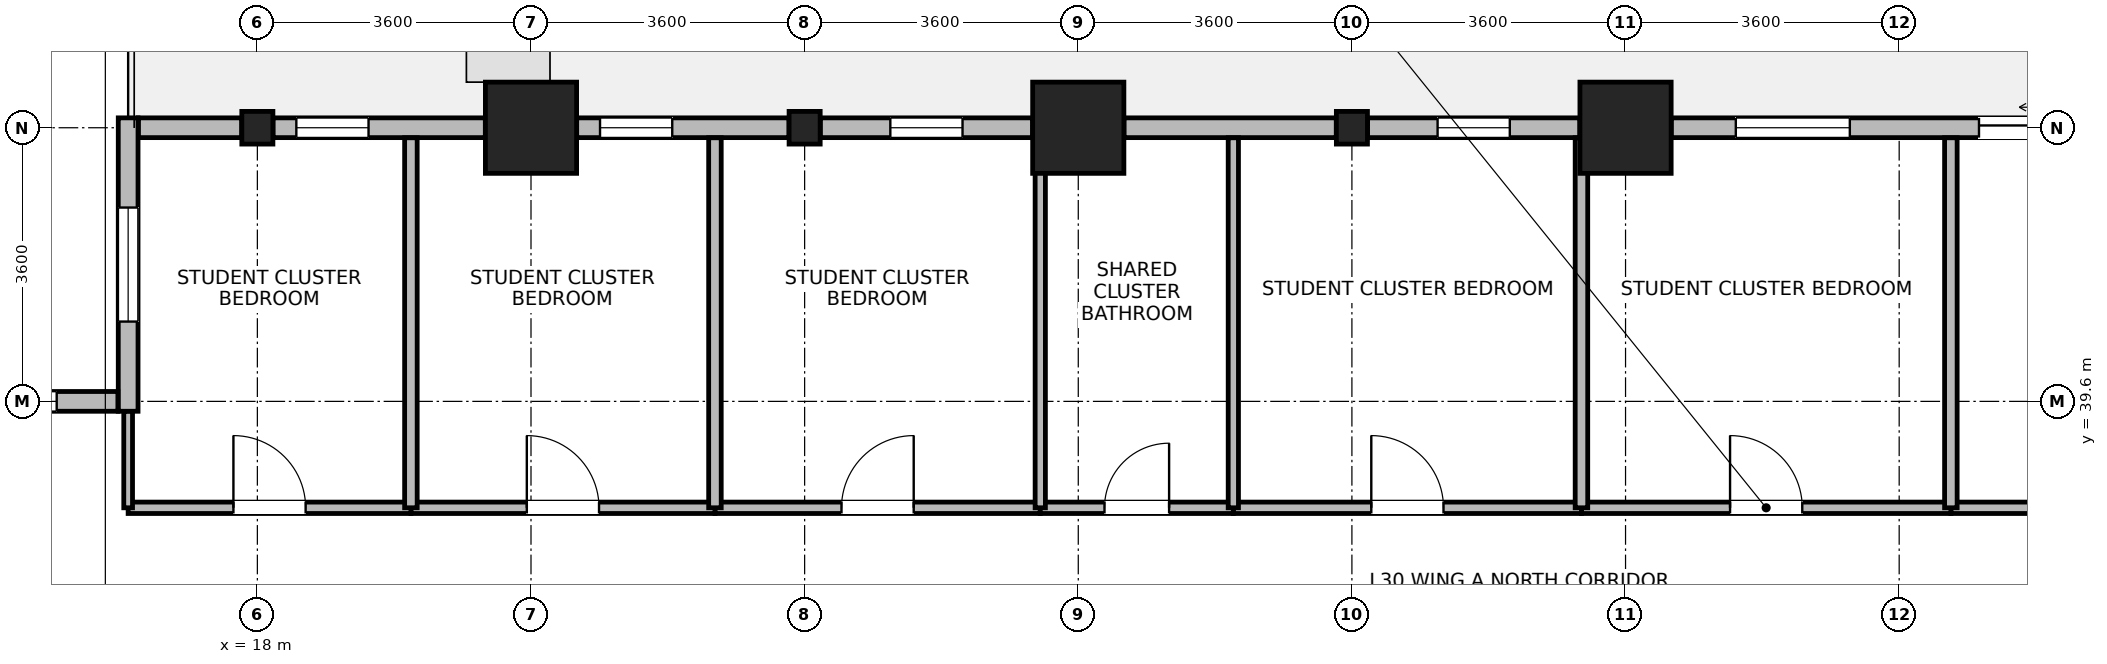
"""IFC4 building model, lengths in metres.
Left out: names, types, materials, properties, quantities, classifications, styles, units other than length and angle.
Written with IfcOpenShell. Run it as: python <this file> out.ifc"""

import sys

from ifc_helpers import new_model, si_unit, direction, frame, frame_2d, origin, origin_2d, place, context, subcontext, project, spatial, rectangle, i_section, extrude, source, transform, mapped, element, fill, save


model = new_model("IFC4")
c1 = context("Model", 3, precision=1e-05, world=origin(), true_north=direction((0.0, 1.0)))
c2 = subcontext(c1, "Body", "Model", "MODEL_VIEW")
j1 = project(units=[si_unit("LENGTHUNIT", "METRE"), si_unit("PLANEANGLEUNIT", "RADIAN")], contexts=[c1])
p1 = place(None, origin())
s1 = spatial("IfcSite", under=j1, at=p1, CompositionType="ELEMENT")
p2 = place(p1, origin())
s2 = spatial("IfcBuilding", under=s1, at=p2, CompositionType="ELEMENT")
p3 = place(p2, frame((0.0, 0.0, 119.3)))
s3 = spatial("IfcBuildingStorey", under=s2, at=p3, CompositionType="ELEMENT", Elevation=119.3)
m1 = source(origin(), c2, "Body", "SweptSolid", [
    extrude(rectangle(XDim=1.2, YDim=1.2, at=origin_2d()), origin(), (0.0, 0.0, 1.0), 3.7),
])
for number, where, z_axis, x_axis in (
    (1, (21.6, 43.2, 0.0), (0.0, 0.0, 1.0), (1.0, 0.0, 0.0)),
    (2, (28.8, 43.2, 0.0), (0.0, 0.0, 1.0), (1.0, 0.0, 0.0)),
    (3, (36.0, 43.2, 0.0), (0.0, 0.0, 1.0), (1.0, 0.0, 0.0)),
):
    element("IfcColumn", number, at=place(p3, frame(where, z_axis=z_axis, x_axis=x_axis)), inside=s3, PredefinedType="COLUMN", context=c2, shape_type="MappedRepresentation", body=[
        mapped(m1, transform((0.0, 0.0, 0.0), x_axis=(1.0, 0.0, 0.0), y_axis=(0.0, 1.0, 0.0), z_axis=(0.0, 0.0, 1.0), scale=1.0)),
    ])
m2 = source(origin(), c2, "Body", "SweptSolid", [
    extrude(i_section(OverallWidth=0.409, OverallDepth=0.43, WebThickness=0.024, FlangeThickness=0.033, FilletRadius=0.015, at=origin_2d()), origin(), (0.0, 0.0, 1.0), 3.7),
])
for number, where, z_axis, x_axis in (
    (4, (18.0, 43.2, 0.0), (0.0, 0.0, 1.0), (1.0, 0.0, 0.0)),
    (5, (25.2, 43.2, 0.0), (0.0, 0.0, 1.0), (1.0, 0.0, 0.0)),
    (6, (32.4, 43.2, 0.0), (0.0, 0.0, 1.0), (1.0, 0.0, 0.0)),
):
    element("IfcColumn", number, at=place(p3, frame(where, z_axis=z_axis, x_axis=x_axis)), inside=s3, PredefinedType="COLUMN", context=c2, shape_type="MappedRepresentation", body=[
        mapped(m2, transform((0.0, 0.0, 0.0), x_axis=(1.0, 0.0, 0.0), y_axis=(0.0, 1.0, 0.0), z_axis=(0.0, 0.0, 1.0), scale=1.0)),
    ])
p4 = place(p3, frame((36.601, 43.2, 0.0), z_axis=(0.0, 0.0, 1.0), x_axis=(1.0, 0.0, 0.0)))
e7 = element("IfcWall", 7, at=p4, inside=s3, PredefinedType="STANDARD", context=c2, shape_type="SweptSolid", body=[
    extrude(rectangle(XDim=9.598, YDim=0.26, at=frame_2d((4.799, 0.0))), origin(), (0.0, 0.0, 1.0), 2.98),
])
p5 = place(p4, frame((4.049, 0.0, 0.0)))
e8 = element("IfcOpeningElement", 8, at=p5, cuts=e7, PredefinedType="OPENING", context=c2, shape_type="SweptSolid", body=[
    extrude(rectangle(XDim=1.5, YDim=2.15, at=frame_2d((0.75, 1.075))), frame((0.0, 0.14, 0.0), z_axis=(0.0, -1.0, 0.0), x_axis=(1.0, 0.0, 0.0)), (0.0, 0.0, 1.0), 0.28),
])
p6 = place(p4, frame((0.85, 0.0, 0.85)))
e9 = element("IfcOpeningElement", 9, at=p6, cuts=e7, PredefinedType="OPENING", context=c2, shape_type="SweptSolid", body=[
    extrude(rectangle(XDim=1.5, YDim=1.85, at=frame_2d((0.75, 0.925))), frame((0.0, 0.14, 0.0), z_axis=(0.0, -1.0, 0.0), x_axis=(1.0, 0.0, 0.0)), (0.0, 0.0, 1.0), 0.28),
])
p7 = place(p4, frame((7.248, 0.0, 0.85)))
e10 = element("IfcOpeningElement", 10, at=p7, cuts=e7, PredefinedType="OPENING", context=c2, shape_type="SweptSolid", body=[
    extrude(rectangle(XDim=1.5, YDim=1.85, at=frame_2d((0.75, 0.925))), frame((0.0, 0.14, 0.0), z_axis=(0.0, -1.0, 0.0), x_axis=(1.0, 0.0, 0.0)), (0.0, 0.0, 1.0), 0.28),
])
p8 = place(p3, frame((32.605, 43.2, 0.0), z_axis=(0.0, 0.0, 1.0), x_axis=(1.0, 0.0, 0.0)))
e11 = element("IfcWall", 11, at=p8, inside=s3, PredefinedType="STANDARD", context=c2, shape_type="SweptSolid", body=[
    extrude(rectangle(XDim=2.793, YDim=0.26, at=frame_2d((1.397, 0.0))), origin(), (0.0, 0.0, 1.0), 2.98),
])
p9 = place(p8, frame((0.922, 0.0, 0.85)))
e12 = element("IfcOpeningElement", 12, at=p9, cuts=e11, PredefinedType="OPENING", context=c2, shape_type="SweptSolid", body=[
    extrude(rectangle(XDim=0.95, YDim=1.75, at=frame_2d((0.475, 0.875))), frame((0.0, 0.14, 0.0), z_axis=(0.0, -1.0, 0.0), x_axis=(1.0, 0.0, 0.0)), (0.0, 0.0, 1.0), 0.28),
])
p10 = place(p3, frame((29.401, 43.2, 0.0), z_axis=(0.0, 0.0, 1.0), x_axis=(1.0, 0.0, 0.0)))
e13 = element("IfcWall", 13, at=p10, inside=s3, PredefinedType="STANDARD", context=c2, shape_type="SweptSolid", body=[
    extrude(rectangle(XDim=2.794, YDim=0.26, at=frame_2d((1.397, 0.0))), origin(), (0.0, 0.0, 1.0), 2.98),
])
p11 = place(p3, frame((25.406, 43.2, 0.0), z_axis=(0.0, 0.0, 1.0), x_axis=(1.0, 0.0, 0.0)))
e14 = element("IfcWall", 14, at=p11, inside=s3, PredefinedType="STANDARD", context=c2, shape_type="SweptSolid", body=[
    extrude(rectangle(XDim=2.793, YDim=0.26, at=frame_2d((1.397, 0.0))), origin(), (0.0, 0.0, 1.0), 2.98),
])
p12 = place(p11, frame((0.922, 0.0, 0.85)))
e15 = element("IfcOpeningElement", 15, at=p12, cuts=e14, PredefinedType="OPENING", context=c2, shape_type="SweptSolid", body=[
    extrude(rectangle(XDim=0.95, YDim=1.75, at=frame_2d((0.475, 0.875))), frame((0.0, 0.14, 0.0), z_axis=(0.0, -1.0, 0.0), x_axis=(1.0, 0.0, 0.0)), (0.0, 0.0, 1.0), 0.28),
])
p13 = place(p3, frame((22.201, 43.2, 0.0), z_axis=(0.0, 0.0, 1.0), x_axis=(1.0, 0.0, 0.0)))
e16 = element("IfcWall", 16, at=p13, inside=s3, PredefinedType="STANDARD", context=c2, shape_type="SweptSolid", body=[
    extrude(rectangle(XDim=2.793, YDim=0.26, at=frame_2d((1.397, 0.0))), origin(), (0.0, 0.0, 1.0), 2.98),
])
p14 = place(p13, frame((0.307, 0.0, 0.85)))
e17 = element("IfcOpeningElement", 17, at=p14, cuts=e16, PredefinedType="OPENING", context=c2, shape_type="SweptSolid", body=[
    extrude(rectangle(XDim=0.95, YDim=1.75, at=frame_2d((0.475, 0.875))), frame((0.0, 0.14, 0.0), z_axis=(0.0, -1.0, 0.0), x_axis=(1.0, 0.0, 0.0)), (0.0, 0.0, 1.0), 0.28),
])
p15 = place(p3, frame((18.206, 43.2, 0.0), z_axis=(0.0, 0.0, 1.0), x_axis=(1.0, 0.0, 0.0)))
e18 = element("IfcWall", 18, at=p15, inside=s3, PredefinedType="STANDARD", context=c2, shape_type="SweptSolid", body=[
    extrude(rectangle(XDim=2.793, YDim=0.26, at=frame_2d((1.397, 0.0))), origin(), (0.0, 0.0, 1.0), 2.98),
])
p16 = place(p15, frame((0.307, 0.0, 0.85)))
e19 = element("IfcOpeningElement", 19, at=p16, cuts=e18, PredefinedType="OPENING", context=c2, shape_type="SweptSolid", body=[
    extrude(rectangle(XDim=0.95, YDim=1.75, at=frame_2d((0.475, 0.875))), frame((0.0, 0.14, 0.0), z_axis=(0.0, -1.0, 0.0), x_axis=(1.0, 0.0, 0.0)), (0.0, 0.0, 1.0), 0.28),
])
p17 = place(p3, frame((16.435, 43.2, 0.0), z_axis=(0.0, 0.0, 1.0), x_axis=(1.0, 0.0, 0.0)))
e20 = element("IfcWall", 20, at=p17, inside=s3, PredefinedType="STANDARD", context=c2, shape_type="SweptSolid", body=[
    extrude(rectangle(XDim=1.359, YDim=0.26, at=frame_2d((0.68, 0.0))), origin(), (0.0, 0.0, 1.0), 2.98),
])
p18 = place(p3, frame((16.3, 39.47, 0.0), z_axis=(0.0, 0.0, 1.0), x_axis=(0.0, 1.0, 0.0)))
e21 = element("IfcWall", 21, at=p18, inside=s3, PredefinedType="STANDARD", context=c2, shape_type="SweptSolid", body=[
    extrude(rectangle(XDim=3.86, YDim=0.26, at=frame_2d((1.93, 0.0))), origin(), (0.0, 0.0, 1.0), 3.43),
])
p19 = place(p18, frame((1.18, 0.0, 0.85)))
e22 = element("IfcOpeningElement", 22, at=p19, cuts=e21, PredefinedType="OPENING", context=c2, shape_type="SweptSolid", body=[
    extrude(rectangle(XDim=1.5, YDim=1.85, at=frame_2d((0.75, 0.925))), frame((0.0, 0.14, 0.0), z_axis=(0.0, -1.0, 0.0), x_axis=(1.0, 0.0, 0.0)), (0.0, 0.0, 1.0), 0.28),
])
p20 = place(p3, frame((6.835, 39.6, 0.0), z_axis=(0.0, 0.0, 1.0), x_axis=(1.0, 0.0, 0.0)))
e23 = element("IfcWall", 23, at=p20, inside=s3, PredefinedType="STANDARD", context=c2, shape_type="SweptSolid", body=[
    extrude(rectangle(XDim=9.33, YDim=0.26, at=frame_2d((4.665, 0.0))), origin(), (0.0, 0.0, 1.0), 3.43),
])
p21 = place(p20, frame((0.805, 0.0, 0.85)))
e24 = element("IfcOpeningElement", 24, at=p21, cuts=e23, PredefinedType="OPENING", context=c2, shape_type="SweptSolid", body=[
    extrude(rectangle(XDim=1.5, YDim=1.85, at=frame_2d((0.75, 0.925))), frame((0.0, 0.14, 0.0), z_axis=(0.0, -1.0, 0.0), x_axis=(1.0, 0.0, 0.0)), (0.0, 0.0, 1.0), 0.28),
])
p22 = place(p20, frame((3.915, 0.0, 0.85)))
e25 = element("IfcOpeningElement", 25, at=p22, cuts=e23, PredefinedType="OPENING", context=c2, shape_type="SweptSolid", body=[
    extrude(rectangle(XDim=1.5, YDim=1.85, at=frame_2d((0.75, 0.925))), frame((0.0, 0.14, 0.0), z_axis=(0.0, -1.0, 0.0), x_axis=(1.0, 0.0, 0.0)), (0.0, 0.0, 1.0), 0.28),
])
p23 = place(p20, frame((7.025, 0.0, 0.85)))
e26 = element("IfcOpeningElement", 26, at=p23, cuts=e23, PredefinedType="OPENING", context=c2, shape_type="SweptSolid", body=[
    extrude(rectangle(XDim=1.5, YDim=1.85, at=frame_2d((0.75, 0.925))), frame((0.0, 0.14, 0.0), z_axis=(0.0, -1.0, 0.0), x_axis=(1.0, 0.0, 0.0)), (0.0, 0.0, 1.0), 0.28),
])
p24 = place(p3, frame((40.28, 38.2, 0.0), z_axis=(0.0, 0.0, 1.0), x_axis=(1.0, 0.0, 0.0)))
e27 = element("IfcWall", 27, at=p24, inside=s3, PredefinedType="PARTITIONING", context=c2, shape_type="SweptSolid", body=[
    extrude(rectangle(XDim=8.96, YDim=0.15, at=frame_2d((4.48, 0.0))), origin(), (0.0, 0.0, 1.0), 3.43),
])
p25 = place(p24, frame((4.03, 0.0, 0.0)))
e28 = element("IfcOpeningElement", 28, at=p25, cuts=e27, PredefinedType="OPENING", context=c2, shape_type="SweptSolid", body=[
    extrude(rectangle(XDim=0.9, YDim=2.08, at=frame_2d((0.45, 1.04))), frame((0.0, 0.085, 0.0), z_axis=(0.0, -1.0, 0.0), x_axis=(1.0, 0.0, 0.0)), (0.0, 0.0, 1.0), 0.17),
])
p26 = place(p3, frame((35.42, 38.2, 0.0), z_axis=(0.0, 0.0, 1.0), x_axis=(1.0, 0.0, 0.0)))
e29 = element("IfcWall", 29, at=p26, inside=s3, PredefinedType="PARTITIONING", context=c2, shape_type="SweptSolid", body=[
    extrude(rectangle(XDim=4.86, YDim=0.15, at=frame_2d((2.43, 0.0))), origin(), (0.0, 0.0, 1.0), 3.43),
])
p27 = place(p26, frame((1.955, 0.0, 0.0)))
e30 = element("IfcOpeningElement", 30, at=p27, cuts=e29, PredefinedType="OPENING", context=c2, shape_type="SweptSolid", body=[
    extrude(rectangle(XDim=0.95, YDim=2.1, at=frame_2d((0.475, 1.05))), frame((0.0, 0.085, 0.0), z_axis=(0.0, -1.0, 0.0), x_axis=(1.0, 0.0, 0.0)), (0.0, 0.0, 1.0), 0.17),
])
p28 = place(p3, frame((30.84, 38.2, 0.0), z_axis=(0.0, 0.0, 1.0), x_axis=(1.0, 0.0, 0.0)))
e31 = element("IfcWall", 31, at=p28, inside=s3, PredefinedType="PARTITIONING", context=c2, shape_type="SweptSolid", body=[
    extrude(rectangle(XDim=4.58, YDim=0.15, at=frame_2d((2.29, 0.0))), origin(), (0.0, 0.0, 1.0), 3.43),
])
p29 = place(p28, frame((1.815, 0.0, 0.0)))
e32 = element("IfcOpeningElement", 32, at=p29, cuts=e31, PredefinedType="OPENING", context=c2, shape_type="SweptSolid", body=[
    extrude(rectangle(XDim=0.95, YDim=2.1, at=frame_2d((0.475, 1.05))), frame((0.0, 0.085, 0.0), z_axis=(0.0, -1.0, 0.0), x_axis=(1.0, 0.0, 0.0)), (0.0, 0.0, 1.0), 0.17),
])
p30 = place(p3, frame((24.02, 38.2, 0.0), z_axis=(0.0, 0.0, 1.0), x_axis=(1.0, 0.0, 0.0)))
e33 = element("IfcWall", 33, at=p30, inside=s3, PredefinedType="PARTITIONING", context=c2, shape_type="SweptSolid", body=[
    extrude(rectangle(XDim=4.28, YDim=0.15, at=frame_2d((2.14, 0.0))), origin(), (0.0, 0.0, 1.0), 3.43),
])
p31 = place(p30, frame((1.665, 0.0, 0.0)))
e34 = element("IfcOpeningElement", 34, at=p31, cuts=e33, PredefinedType="OPENING", context=c2, shape_type="SweptSolid", body=[
    extrude(rectangle(XDim=0.95, YDim=2.1, at=frame_2d((0.475, 1.05))), frame((0.0, 0.085, 0.0), z_axis=(0.0, -1.0, 0.0), x_axis=(1.0, 0.0, 0.0)), (0.0, 0.0, 1.0), 0.17),
])
p32 = place(p3, frame((20.02, 38.2, 0.0), z_axis=(0.0, 0.0, 1.0), x_axis=(1.0, 0.0, 0.0)))
e35 = element("IfcWall", 35, at=p32, inside=s3, PredefinedType="PARTITIONING", context=c2, shape_type="SweptSolid", body=[
    extrude(rectangle(XDim=4.0, YDim=0.15, at=frame_2d((2.0, 0.0))), origin(), (0.0, 0.0, 1.0), 3.43),
])
p33 = place(p32, frame((1.525, 0.0, 0.0)))
e36 = element("IfcOpeningElement", 36, at=p33, cuts=e35, PredefinedType="OPENING", context=c2, shape_type="SweptSolid", body=[
    extrude(rectangle(XDim=0.95, YDim=2.1, at=frame_2d((0.475, 1.05))), frame((0.0, 0.085, 0.0), z_axis=(0.0, -1.0, 0.0), x_axis=(1.0, 0.0, 0.0)), (0.0, 0.0, 1.0), 0.17),
])
p34 = place(p3, frame((16.3, 38.2, 0.0), z_axis=(0.0, 0.0, 1.0), x_axis=(1.0, 0.0, 0.0)))
e37 = element("IfcWall", 37, at=p34, inside=s3, PredefinedType="PARTITIONING", context=c2, shape_type="SweptSolid", body=[
    extrude(rectangle(XDim=3.72, YDim=0.15, at=frame_2d((1.86, 0.0))), origin(), (0.0, 0.0, 1.0), 3.43),
])
p35 = place(p34, frame((1.385, 0.0, 0.0)))
e38 = element("IfcOpeningElement", 38, at=p35, cuts=e37, PredefinedType="OPENING", context=c2, shape_type="SweptSolid", body=[
    extrude(rectangle(XDim=0.95, YDim=2.1, at=frame_2d((0.475, 1.05))), frame((0.0, 0.085, 0.0), z_axis=(0.0, -1.0, 0.0), x_axis=(1.0, 0.0, 0.0)), (0.0, 0.0, 1.0), 0.17),
])
p36 = place(p3, frame((28.3, 38.2, 0.0), z_axis=(0.0, 0.0, 1.0), x_axis=(1.0, 0.0, 0.0)))
e39 = element("IfcWall", 39, at=p36, inside=s3, PredefinedType="PARTITIONING", context=c2, shape_type="SweptSolid", body=[
    extrude(rectangle(XDim=2.54, YDim=0.15, at=frame_2d((1.27, 0.0))), origin(), (0.0, 0.0, 1.0), 3.43),
])
p37 = place(p36, frame((0.845, 0.0, 0.0)))
e40 = element("IfcOpeningElement", 40, at=p37, cuts=e39, PredefinedType="OPENING", context=c2, shape_type="SweptSolid", body=[
    extrude(rectangle(XDim=0.85, YDim=2.04, at=frame_2d((0.425, 1.02))), frame((0.0, 0.085, 0.0), z_axis=(0.0, -1.0, 0.0), x_axis=(1.0, 0.0, 0.0)), (0.0, 0.0, 1.0), 0.17),
])
p38 = place(p3, frame((16.3, 38.2, 0.0), z_axis=(0.0, 0.0, 1.0), x_axis=(0.0, 1.0, 0.0)))
e41 = element("IfcWall", 41, at=p38, inside=s3, PredefinedType="PARTITIONING", context=c2, shape_type="SweptSolid", body=[
    extrude(rectangle(XDim=1.268, YDim=0.115, at=frame_2d((0.634, 0.0))), origin(), (0.0, 0.0, 1.0), 3.43),
])
for number, where, z_axis, x_axis in (
    (42, (20.02, 38.2, 0.0), (0.0, 0.0, 1.0), (0.0, 1.0, 0.0)),
    (43, (24.02, 38.2, 0.0), (0.0, 0.0, 1.0), (0.0, 1.0, 0.0)),
):
    element("IfcWall", number, at=place(p3, frame(where, z_axis=z_axis, x_axis=x_axis)), inside=s3, PredefinedType="PARTITIONING", context=c2, shape_type="SweptSolid", body=[
        extrude(rectangle(XDim=4.868, YDim=0.165, at=frame_2d((2.434, 0.0))), origin(), (0.0, 0.0, 1.0), 3.43),
    ])
for number, where, z_axis, x_axis in (
    (44, (28.3, 38.2, 0.0), (0.0, 0.0, 1.0), (0.0, 1.0, 0.0)),
    (45, (30.84, 38.2, 0.0), (0.0, 0.0, 1.0), (0.0, 1.0, 0.0)),
):
    element("IfcWall", number, at=place(p3, frame(where, z_axis=z_axis, x_axis=x_axis)), inside=s3, PredefinedType="PARTITIONING", context=c2, shape_type="SweptSolid", body=[
        extrude(rectangle(XDim=4.868, YDim=0.135, at=frame_2d((2.434, 0.0))), origin(), (0.0, 0.0, 1.0), 3.43),
    ])
for number, where, z_axis, x_axis in (
    (46, (35.42, 38.2, 0.0), (0.0, 0.0, 1.0), (0.0, 1.0, 0.0)),
    (47, (40.28, 38.2, 0.0), (0.0, 0.0, 1.0), (0.0, 1.0, 0.0)),
):
    element("IfcWall", number, at=place(p3, frame(where, z_axis=z_axis, x_axis=x_axis)), inside=s3, PredefinedType="PARTITIONING", context=c2, shape_type="SweptSolid", body=[
        extrude(rectangle(XDim=4.868, YDim=0.165, at=frame_2d((2.434, 0.0))), origin(), (0.0, 0.0, 1.0), 3.43),
    ])
p39 = place(p5, origin())
e48 = element("IfcDoor", 48, at=p39, inside=s3, OperationType="SLIDING_TO_LEFT", PredefinedType="DOOR", context=c2, shape_type="SweptSolid", body=[
    extrude(rectangle(XDim=1.5, YDim=2.15, at=frame_2d((0.75, 1.075))), frame((0.0, 0.025, 0.0), z_axis=(0.0, -1.0, 0.0), x_axis=(1.0, 0.0, 0.0)), (0.0, 0.0, 1.0), 0.05),
])
fill(e8, e48)
p40 = place(p6, origin())
e49 = element("IfcWindow", 49, at=p40, inside=s3, PartitioningType="SINGLE_PANEL", PredefinedType="WINDOW", context=c2, shape_type="SweptSolid", body=[
    extrude(rectangle(XDim=1.5, YDim=1.85, at=frame_2d((0.75, 0.925))), frame((0.0, 0.03, 0.0), z_axis=(0.0, -1.0, 0.0), x_axis=(1.0, 0.0, 0.0)), (0.0, 0.0, 1.0), 0.06),
])
fill(e9, e49)
p41 = place(p9, origin())
e50 = element("IfcWindow", 50, at=p41, inside=s3, PartitioningType="SINGLE_PANEL", PredefinedType="WINDOW", context=c2, shape_type="SweptSolid", body=[
    extrude(rectangle(XDim=0.95, YDim=1.75, at=frame_2d((0.475, 0.875))), frame((0.0, 0.03, 0.0), z_axis=(0.0, -1.0, 0.0), x_axis=(1.0, 0.0, 0.0)), (0.0, 0.0, 1.0), 0.06),
])
fill(e12, e50)
p42 = place(p12, origin())
e51 = element("IfcWindow", 51, at=p42, inside=s3, PartitioningType="SINGLE_PANEL", PredefinedType="WINDOW", context=c2, shape_type="SweptSolid", body=[
    extrude(rectangle(XDim=0.95, YDim=1.75, at=frame_2d((0.475, 0.875))), frame((0.0, 0.03, 0.0), z_axis=(0.0, -1.0, 0.0), x_axis=(1.0, 0.0, 0.0)), (0.0, 0.0, 1.0), 0.06),
])
fill(e15, e51)
p43 = place(p14, origin())
e52 = element("IfcWindow", 52, at=p43, inside=s3, PartitioningType="SINGLE_PANEL", PredefinedType="WINDOW", context=c2, shape_type="SweptSolid", body=[
    extrude(rectangle(XDim=0.95, YDim=1.75, at=frame_2d((0.475, 0.875))), frame((0.0, 0.03, 0.0), z_axis=(0.0, -1.0, 0.0), x_axis=(1.0, 0.0, 0.0)), (0.0, 0.0, 1.0), 0.06),
])
fill(e17, e52)
p44 = place(p16, origin())
e53 = element("IfcWindow", 53, at=p44, inside=s3, PartitioningType="SINGLE_PANEL", PredefinedType="WINDOW", context=c2, shape_type="SweptSolid", body=[
    extrude(rectangle(XDim=0.95, YDim=1.75, at=frame_2d((0.475, 0.875))), frame((0.0, 0.03, 0.0), z_axis=(0.0, -1.0, 0.0), x_axis=(1.0, 0.0, 0.0)), (0.0, 0.0, 1.0), 0.06),
])
fill(e19, e53)
p45 = place(p19, origin())
e54 = element("IfcWindow", 54, at=p45, inside=s3, PartitioningType="SINGLE_PANEL", PredefinedType="WINDOW", context=c2, shape_type="SweptSolid", body=[
    extrude(rectangle(XDim=1.5, YDim=1.85, at=frame_2d((0.75, 0.925))), frame((0.0, 0.03, 0.0), z_axis=(0.0, -1.0, 0.0), x_axis=(1.0, 0.0, 0.0)), (0.0, 0.0, 1.0), 0.06),
])
fill(e22, e54)
p46 = place(p23, origin())
e55 = element("IfcWindow", 55, at=p46, inside=s3, PartitioningType="SINGLE_PANEL", PredefinedType="WINDOW", context=c2, shape_type="SweptSolid", body=[
    extrude(rectangle(XDim=1.5, YDim=1.85, at=frame_2d((0.75, 0.925))), frame((0.0, 0.03, 0.0), z_axis=(0.0, -1.0, 0.0), x_axis=(1.0, 0.0, 0.0)), (0.0, 0.0, 1.0), 0.06),
])
fill(e26, e55)
p47 = place(p27, origin())
e56 = element("IfcDoor", 56, at=p47, inside=s3, OperationType="SINGLE_SWING_LEFT", PredefinedType="DOOR", context=c2, shape_type="SweptSolid", body=[
    extrude(rectangle(XDim=0.95, YDim=2.1, at=frame_2d((0.475, 1.05))), frame((0.0, 0.025, 0.0), z_axis=(0.0, -1.0, 0.0), x_axis=(1.0, 0.0, 0.0)), (0.0, 0.0, 1.0), 0.05),
])
fill(e30, e56)
p48 = place(p29, origin())
e57 = element("IfcDoor", 57, at=p48, inside=s3, OperationType="SINGLE_SWING_LEFT", PredefinedType="DOOR", context=c2, shape_type="SweptSolid", body=[
    extrude(rectangle(XDim=0.95, YDim=2.1, at=frame_2d((0.475, 1.05))), frame((0.0, 0.025, 0.0), z_axis=(0.0, -1.0, 0.0), x_axis=(1.0, 0.0, 0.0)), (0.0, 0.0, 1.0), 0.05),
])
fill(e32, e57)
p49 = place(p31, origin())
e58 = element("IfcDoor", 58, at=p49, inside=s3, OperationType="SINGLE_SWING_RIGHT", PredefinedType="DOOR", context=c2, shape_type="SweptSolid", body=[
    extrude(rectangle(XDim=0.95, YDim=2.1, at=frame_2d((0.475, 1.05))), frame((0.0, 0.025, 0.0), z_axis=(0.0, -1.0, 0.0), x_axis=(1.0, 0.0, 0.0)), (0.0, 0.0, 1.0), 0.05),
])
fill(e34, e58)
p50 = place(p33, origin())
e59 = element("IfcDoor", 59, at=p50, inside=s3, OperationType="SINGLE_SWING_LEFT", PredefinedType="DOOR", context=c2, shape_type="SweptSolid", body=[
    extrude(rectangle(XDim=0.95, YDim=2.1, at=frame_2d((0.475, 1.05))), frame((0.0, 0.025, 0.0), z_axis=(0.0, -1.0, 0.0), x_axis=(1.0, 0.0, 0.0)), (0.0, 0.0, 1.0), 0.05),
])
fill(e36, e59)
p51 = place(p35, origin())
e60 = element("IfcDoor", 60, at=p51, inside=s3, OperationType="SINGLE_SWING_LEFT", PredefinedType="DOOR", context=c2, shape_type="SweptSolid", body=[
    extrude(rectangle(XDim=0.95, YDim=2.1, at=frame_2d((0.475, 1.05))), frame((0.0, 0.025, 0.0), z_axis=(0.0, -1.0, 0.0), x_axis=(1.0, 0.0, 0.0)), (0.0, 0.0, 1.0), 0.05),
])
fill(e38, e60)
p52 = place(p37, origin())
e61 = element("IfcDoor", 61, at=p52, inside=s3, OperationType="SINGLE_SWING_RIGHT", PredefinedType="DOOR", context=c2, shape_type="SweptSolid", body=[
    extrude(rectangle(XDim=0.85, YDim=2.04, at=frame_2d((0.425, 1.02))), frame((0.0, 0.025, 0.0), z_axis=(0.0, -1.0, 0.0), x_axis=(1.0, 0.0, 0.0)), (0.0, 0.0, 1.0), 0.05),
])
fill(e40, e61)
save(model, sys.argv[1])
